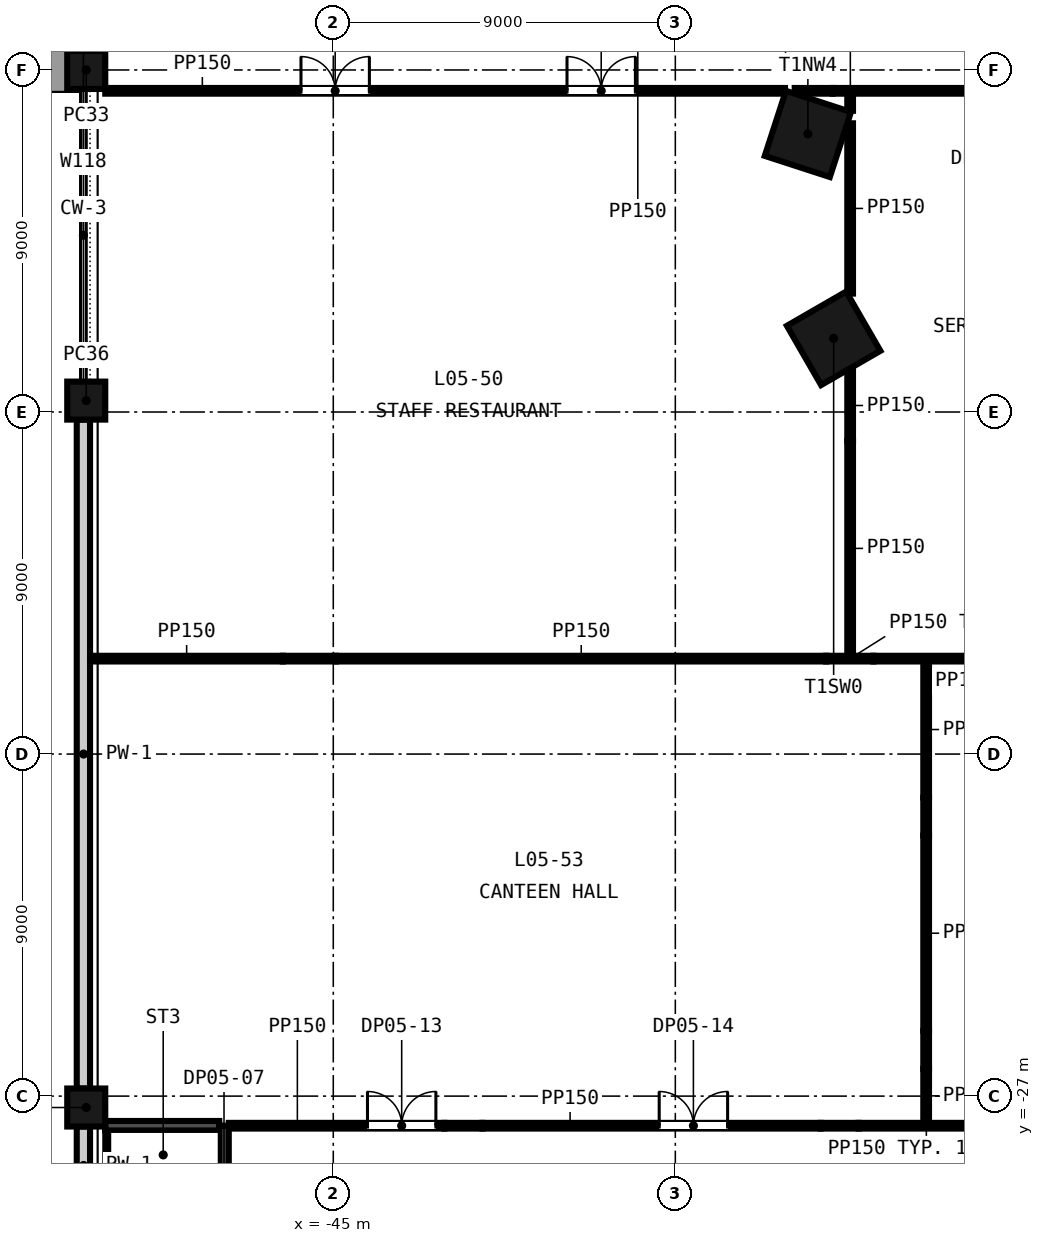
"""IFC4 building model, lengths in metres.
Left out: names, types, materials, properties, quantities, classifications, styles, units other than length and angle.
Written with IfcOpenShell. Run it as: python <this file> out.ifc"""

import sys

from ifc_helpers import new_model, si_unit, direction, frame, frame_2d, origin, origin_2d, place, context, subcontext, project, spatial, rectangle, extrude, element, fill, save


model = new_model("IFC4")
c1 = context("Model", 3, precision=1e-05, world=origin(), true_north=direction((0.0, 1.0)))
c2 = subcontext(c1, "Body", "Model", "MODEL_VIEW")
j1 = project(units=[si_unit("LENGTHUNIT", "METRE"), si_unit("PLANEANGLEUNIT", "RADIAN")], contexts=[c1])
p1 = place(None, origin())
s1 = spatial("IfcSite", under=j1, at=p1, CompositionType="ELEMENT")
p2 = place(p1, origin())
s2 = spatial("IfcBuilding", under=s1, at=p2, CompositionType="ELEMENT")
p3 = place(p2, frame((0.0, 0.0, 31.5)))
s3 = spatial("IfcBuildingStorey", under=s2, at=p3, CompositionType="ELEMENT", Elevation=31.5)
for number, where, z_axis, x_axis in (
    (1, (-32.512, -1.683, -0.3), (0.0, 0.0, 1.0), (-0.309, -0.951, 0.0)),
    (2, (-31.834, -7.061, -0.3), (0.0, 0.0, 1.0), (0.5, -0.866, 0.0)),
):
    element("IfcColumn", number, at=place(p3, frame(where, z_axis=z_axis, x_axis=x_axis)), inside=s3, PredefinedType="COLUMN", context=c2, shape_type="SweptSolid", body=[
        extrude(rectangle(XDim=1.8, YDim=1.8, at=origin_2d()), origin(), (0.0, 0.0, 1.0), 4.65),
    ])
for number, where, z_axis, x_axis in (
    (3, (-51.5, 0.0, -0.3), (0.0, 0.0, 1.0), (0.0, -1.0, 0.0)),
    (4, (-51.5, -27.3, -0.3), (0.0, 0.0, 1.0), (0.0, 1.0, 0.0)),
    (5, (-51.5, -8.7, -0.3), (0.0, 0.0, 1.0), (0.0, 1.0, 0.0)),
):
    element("IfcColumn", number, at=place(p3, frame(where, z_axis=z_axis, x_axis=x_axis)), inside=s3, PredefinedType="COLUMN", context=c2, shape_type="SweptSolid", body=[
        extrude(rectangle(XDim=1.0, YDim=1.0, at=origin_2d()), origin(), (0.0, 0.0, 1.0), 4.65),
    ])
p4 = place(p3, frame((-51.575, -9.2, -0.3), z_axis=(0.0, 0.0, 1.0), x_axis=(0.0, -1.0, 0.0)))
e6 = element("IfcWall", 6, at=p4, inside=s3, PredefinedType="SOLIDWALL", context=c2, shape_type="SweptSolid", body=[
    extrude(rectangle(XDim=17.6, YDim=0.35, at=frame_2d((8.8, 0.0))), origin(), (0.0, 0.0, 1.0), 3.75),
])
p5 = place(p3, frame((-51.575, -27.8, -0.3), z_axis=(0.0, 0.0, 1.0), x_axis=(0.0, -1.0, 0.0)))
e7 = element("IfcWall", 7, at=p5, inside=s3, PredefinedType="SOLIDWALL", context=c2, shape_type="SweptSolid", body=[
    extrude(rectangle(XDim=6.2, YDim=0.35, at=frame_2d((3.1, 0.0))), origin(), (0.0, 0.0, 1.0), 3.75),
])
p6 = place(p5, frame((2.1, 0.0, 1.2)))
e8 = element("IfcOpeningElement", 8, at=p6, cuts=e7, PredefinedType="OPENING", context=c2, shape_type="SweptSolid", body=[
    extrude(rectangle(XDim=2.0, YDim=2.5, at=frame_2d((1.0, 1.25))), frame((0.0, 0.185, 0.0), z_axis=(0.0, -1.0, 0.0), x_axis=(1.0, 0.0, 0.0)), (0.0, 0.0, 1.0), 0.37),
])
p7 = place(p3, frame((-51.0, -27.779, 0.0), z_axis=(0.0, 0.0, 1.0), x_axis=(1.0, 0.0, 0.0)))
e9 = element("IfcWall", 9, at=p7, inside=s3, PredefinedType="SHEAR", context=c2, shape_type="SweptSolid", body=[
    extrude(rectangle(XDim=3.0, YDim=0.25, at=frame_2d((1.5, 0.0))), origin(), (0.0, 0.0, 1.0), 4.35),
])
p8 = place(p3, frame((-47.75, -27.779, 0.0), z_axis=(0.0, 0.0, 1.0), x_axis=(1.0, 0.0, 0.0)))
e10 = element("IfcWall", 10, at=p8, inside=s3, PredefinedType="PARTITIONING", context=c2, shape_type="SweptSolid", body=[
    extrude(rectangle(XDim=5.676, YDim=0.15, at=frame_2d((2.838, 0.0))), origin(), (0.0, 0.0, 1.0), 4.35),
])
p9 = place(p8, frame((3.65, 0.0, 0.0)))
e11 = element("IfcOpeningElement", 11, at=p9, cuts=e10, PredefinedType="OPENING", context=c2, shape_type="SweptSolid", body=[
    extrude(rectangle(XDim=1.8, YDim=2.4, at=frame_2d((0.9, 1.2))), frame((0.0, 0.085, 0.0), z_axis=(0.0, -1.0, 0.0), x_axis=(1.0, 0.0, 0.0)), (0.0, 0.0, 1.0), 0.17),
])
p10 = place(p3, frame((-42.074, -27.779, 0.0), z_axis=(0.0, 0.0, 1.0), x_axis=(1.0, 0.0, 0.0)))
e12 = element("IfcWall", 12, at=p10, inside=s3, PredefinedType="PARTITIONING", context=c2, shape_type="SweptSolid", body=[
    extrude(rectangle(XDim=1.0, YDim=0.15, at=frame_2d((0.5, 0.0))), origin(), (0.0, 0.0, 1.0), 3.261),
])
p11 = place(p3, frame((-41.074, -27.779, 0.0), z_axis=(0.0, 0.0, 1.0), x_axis=(1.0, 0.0, 0.0)))
e13 = element("IfcWall", 13, at=p11, inside=s3, PredefinedType="PARTITIONING", context=c2, shape_type="SweptSolid", body=[
    extrude(rectangle(XDim=8.898, YDim=0.15, at=frame_2d((4.449, 0.0))), origin(), (0.0, 0.0, 1.0), 4.35),
])
p12 = place(p11, frame((4.65, 0.0, 0.0)))
e14 = element("IfcOpeningElement", 14, at=p12, cuts=e13, PredefinedType="OPENING", context=c2, shape_type="SweptSolid", body=[
    extrude(rectangle(XDim=1.8, YDim=2.4, at=frame_2d((0.9, 1.2))), frame((0.0, 0.085, 0.0), z_axis=(0.0, -1.0, 0.0), x_axis=(1.0, 0.0, 0.0)), (0.0, 0.0, 1.0), 0.17),
])
p13 = place(p3, frame((-32.176, -27.779, 0.0), z_axis=(0.0, 0.0, 1.0), x_axis=(1.0, 0.0, 0.0)))
e15 = element("IfcWall", 15, at=p13, inside=s3, PredefinedType="PARTITIONING", context=c2, shape_type="SweptSolid", body=[
    extrude(rectangle(XDim=1.0, YDim=0.15, at=frame_2d((0.5, 0.0))), origin(), (0.0, 0.0, 1.0), 3.261),
])
p14 = place(p3, frame((-31.176, -27.779, 0.0), z_axis=(0.0, 0.0, 1.0), x_axis=(1.0, 0.0, 0.0)))
e16 = element("IfcWall", 16, at=p14, inside=s3, PredefinedType="PARTITIONING", context=c2, shape_type="SweptSolid", body=[
    extrude(rectangle(XDim=6.314, YDim=0.15, at=frame_2d((3.157, 0.0))), origin(), (0.0, 0.0, 1.0), 4.35),
])
p15 = place(p3, frame((-51.4, -15.489, 0.0), z_axis=(0.0, 0.0, 1.0), x_axis=(1.0, 0.0, 0.0)))
e17 = element("IfcWall", 17, at=p15, inside=s3, PredefinedType="PARTITIONING", context=c2, shape_type="SweptSolid", body=[
    extrude(rectangle(XDim=5.073, YDim=0.15, at=frame_2d((2.537, 0.0))), origin(), (0.0, 0.0, 1.0), 4.35),
])
p16 = place(p3, frame((-46.327, -15.489, 0.0), z_axis=(0.0, 0.0, 1.0), x_axis=(1.0, 0.0, 0.0)))
e18 = element("IfcWall", 18, at=p16, inside=s3, PredefinedType="PARTITIONING", context=c2, shape_type="SweptSolid", body=[
    extrude(rectangle(XDim=1.395, YDim=0.15, at=frame_2d((0.698, 0.0))), origin(), (0.0, 0.0, 1.0), 3.369),
])
p17 = place(p3, frame((-44.932, -15.489, 0.0), z_axis=(0.0, 0.0, 1.0), x_axis=(1.0, 0.0, 0.0)))
e19 = element("IfcWall", 19, at=p17, inside=s3, PredefinedType="PARTITIONING", context=c2, shape_type="SweptSolid", body=[
    extrude(rectangle(XDim=12.901, YDim=0.15, at=frame_2d((6.451, 0.0))), origin(), (0.0, 0.0, 1.0), 4.35),
])
p18 = place(p3, frame((-32.031, -15.489, 0.0), z_axis=(0.0, 0.0, 1.0), x_axis=(1.0, 0.0, 0.0)))
e20 = element("IfcWall", 20, at=p18, inside=s3, PredefinedType="PARTITIONING", context=c2, shape_type="SweptSolid", body=[
    extrude(rectangle(XDim=1.244, YDim=0.15, at=frame_2d((0.622, 0.0))), origin(), (0.0, 0.0, 1.0), 3.261),
])
p19 = place(p3, frame((-30.787, -15.489, 0.0), z_axis=(0.0, 0.0, 1.0), x_axis=(1.0, 0.0, 0.0)))
e21 = element("IfcWall", 21, at=p19, inside=s3, PredefinedType="PARTITIONING", context=c2, shape_type="SweptSolid", body=[
    extrude(rectangle(XDim=2.692, YDim=0.15, at=frame_2d((1.346, 0.0))), origin(), (0.0, 0.0, 1.0), 4.35),
])
p20 = place(p3, frame((-51.0, -0.549, 0.0), z_axis=(0.0, 0.0, 1.0), x_axis=(1.0, 0.0, 0.0)))
e22 = element("IfcWall", 22, at=p20, inside=s3, PredefinedType="PARTITIONING", context=c2, shape_type="SweptSolid", body=[
    extrude(rectangle(XDim=17.886, YDim=0.15, at=frame_2d((8.943, 0.0))), origin(), (0.0, 0.0, 1.0), 4.35),
])
p21 = place(p20, frame((5.15, 0.0, 0.0)))
e23 = element("IfcOpeningElement", 23, at=p21, cuts=e22, PredefinedType="OPENING", context=c2, shape_type="SweptSolid", body=[
    extrude(rectangle(XDim=1.8, YDim=2.4, at=frame_2d((0.9, 1.2))), frame((0.0, 0.085, 0.0), z_axis=(0.0, -1.0, 0.0), x_axis=(1.0, 0.0, 0.0)), (0.0, 0.0, 1.0), 0.17),
])
p22 = place(p20, frame((12.15, 0.0, 0.0)))
e24 = element("IfcOpeningElement", 24, at=p22, cuts=e22, PredefinedType="OPENING", context=c2, shape_type="SweptSolid", body=[
    extrude(rectangle(XDim=1.8, YDim=2.4, at=frame_2d((0.9, 1.2))), frame((0.0, 0.085, 0.0), z_axis=(0.0, -1.0, 0.0), x_axis=(1.0, 0.0, 0.0)), (0.0, 0.0, 1.0), 0.17),
])
p23 = place(p3, frame((-32.859, -0.549, 0.0), z_axis=(0.0, 0.0, 1.0), x_axis=(1.0, 0.0, 0.0)))
e25 = element("IfcWall", 25, at=p23, inside=s3, PredefinedType="PARTITIONING", context=c2, shape_type="SweptSolid", body=[
    extrude(rectangle(XDim=1.0, YDim=0.15, at=frame_2d((0.5, 0.0))), origin(), (0.0, 0.0, 1.0), 3.5),
])
p24 = place(p3, frame((-31.859, -0.549, 0.0), z_axis=(0.0, 0.0, 1.0), x_axis=(1.0, 0.0, 0.0)))
e26 = element("IfcWall", 26, at=p24, inside=s3, PredefinedType="PARTITIONING", context=c2, shape_type="SweptSolid", body=[
    extrude(rectangle(XDim=13.784, YDim=0.15, at=frame_2d((6.892, 0.0))), origin(), (0.0, 0.0, 1.0), 4.35),
])
p25 = place(p24, frame((4.359, 0.0, 0.0)))
e27 = element("IfcOpeningElement", 27, at=p25, cuts=e26, PredefinedType="OPENING", context=c2, shape_type="SweptSolid", body=[
    extrude(rectangle(XDim=1.0, YDim=2.1, at=frame_2d((0.5, 1.05))), frame((0.0, 0.085, 0.0), z_axis=(0.0, -1.0, 0.0), x_axis=(1.0, 0.0, 0.0)), (0.0, 0.0, 1.0), 0.17),
])
p26 = place(p3, frame((-47.875, -34.6, 0.0), z_axis=(0.0, 0.0, 1.0), x_axis=(0.0, 1.0, 0.0)))
e28 = element("IfcWall", 28, at=p26, inside=s3, PredefinedType="SHEAR", context=c2, shape_type="SweptSolid", body=[
    extrude(rectangle(XDim=6.821, YDim=0.25, at=frame_2d((3.411, 0.0))), origin(), (0.0, 0.0, 1.0), 4.35),
])
p27 = place(p26, frame((0.65, 0.0, 0.0)))
e29 = element("IfcOpeningElement", 29, at=p27, cuts=e28, PredefinedType="OPENING", context=c2, shape_type="SweptSolid", body=[
    extrude(rectangle(XDim=1.2, YDim=2.1, at=frame_2d((0.6, 1.05))), frame((0.0, 0.135, 0.0), z_axis=(0.0, -1.0, 0.0), x_axis=(1.0, 0.0, 0.0)), (0.0, 0.0, 1.0), 0.27),
])
p28 = place(p3, frame((-31.4, -15.414, 0.0), z_axis=(0.0, 0.0, 1.0), x_axis=(0.0, 1.0, 0.0)))
e30 = element("IfcWall", 30, at=p28, inside=s3, PredefinedType="PARTITIONING", context=c2, shape_type="SweptSolid", body=[
    extrude(rectangle(XDim=5.65, YDim=0.15, at=frame_2d((2.825, 0.0))), origin(), (0.0, 0.0, 1.0), 4.35),
])
p29 = place(p3, frame((-31.4, -9.764, 0.0), z_axis=(0.0, 0.0, 1.0), x_axis=(0.0, 1.0, 0.0)))
e31 = element("IfcWall", 31, at=p29, inside=s3, PredefinedType="PARTITIONING", context=c2, shape_type="SweptSolid", body=[
    extrude(rectangle(XDim=1.871, YDim=0.15, at=frame_2d((0.935, 0.0))), origin(), (0.0, 0.0, 1.0), 3.5),
])
p30 = place(p3, frame((-31.4, -5.884, 0.0), z_axis=(0.0, 0.0, 1.0), x_axis=(0.0, 1.0, 0.0)))
e32 = element("IfcWall", 32, at=p30, inside=s3, PredefinedType="PARTITIONING", context=c2, shape_type="SweptSolid", body=[
    extrude(rectangle(XDim=4.48, YDim=0.15, at=frame_2d((2.24, 0.0))), origin(), (0.0, 0.0, 1.0), 4.35),
])
p31 = place(p3, frame((-31.4, -1.074, 0.0), z_axis=(0.0, 0.0, 1.0), x_axis=(0.0, 1.0, 0.0)))
e33 = element("IfcWall", 33, at=p31, inside=s3, PredefinedType="PARTITIONING", context=c2, shape_type="SweptSolid", body=[
    extrude(rectangle(XDim=0.45, YDim=0.15, at=frame_2d((0.225, 0.0))), origin(), (0.0, 0.0, 1.0), 4.35),
])
p32 = place(p3, frame((-29.4, -27.704, 0.0), z_axis=(0.0, 0.0, 1.0), x_axis=(0.0, 1.0, 0.0)))
e34 = element("IfcWall", 34, at=p32, inside=s3, PredefinedType="PARTITIONING", context=c2, shape_type="SweptSolid", body=[
    extrude(rectangle(XDim=1.421, YDim=0.15, at=frame_2d((0.71, 0.0))), origin(), (0.0, 0.0, 1.0), 4.35),
])
p33 = place(p3, frame((-29.4, -26.283, 0.0), z_axis=(0.0, 0.0, 1.0), x_axis=(0.0, 1.0, 0.0)))
e35 = element("IfcWall", 35, at=p33, inside=s3, PredefinedType="PARTITIONING", context=c2, shape_type="SweptSolid", body=[
    extrude(rectangle(XDim=1.0, YDim=0.15, at=frame_2d((0.5, 0.0))), origin(), (0.0, 0.0, 1.0), 3.261),
])
p34 = place(p3, frame((-29.4, -25.283, 0.0), z_axis=(0.0, 0.0, 1.0), x_axis=(0.0, 1.0, 0.0)))
e36 = element("IfcWall", 36, at=p34, inside=s3, PredefinedType="PARTITIONING", context=c2, shape_type="SweptSolid", body=[
    extrude(rectangle(XDim=5.139, YDim=0.15, at=frame_2d((2.569, 0.0))), origin(), (0.0, 0.0, 1.0), 4.35),
])
p35 = place(p3, frame((-29.4, -20.145, 0.0), z_axis=(0.0, 0.0, 1.0), x_axis=(0.0, 1.0, 0.0)))
e37 = element("IfcWall", 37, at=p35, inside=s3, PredefinedType="PARTITIONING", context=c2, shape_type="SweptSolid", body=[
    extrude(rectangle(XDim=1.0, YDim=0.15, at=frame_2d((0.5, 0.0))), origin(), (0.0, 0.0, 1.0), 3.261),
])
p36 = place(p3, frame((-29.4, -19.145, 0.0), z_axis=(0.0, 0.0, 1.0), x_axis=(0.0, 1.0, 0.0)))
e38 = element("IfcWall", 38, at=p36, inside=s3, PredefinedType="PARTITIONING", context=c2, shape_type="SweptSolid", body=[
    extrude(rectangle(XDim=3.581, YDim=0.15, at=frame_2d((1.79, 0.0))), origin(), (0.0, 0.0, 1.0), 4.35),
])
p37 = place(p21, origin())
e39 = element("IfcDoor", 39, at=p37, inside=s3, OperationType="SINGLE_SWING_LEFT", PredefinedType="DOOR", context=c2, shape_type="SweptSolid", body=[
    extrude(rectangle(XDim=1.8, YDim=2.4, at=frame_2d((0.9, 1.2))), frame((0.0, 0.025, 0.0), z_axis=(0.0, -1.0, 0.0), x_axis=(1.0, 0.0, 0.0)), (0.0, 0.0, 1.0), 0.05),
])
fill(e23, e39)
p38 = place(p22, origin())
e40 = element("IfcDoor", 40, at=p38, inside=s3, OperationType="SINGLE_SWING_LEFT", PredefinedType="DOOR", context=c2, shape_type="SweptSolid", body=[
    extrude(rectangle(XDim=1.8, YDim=2.4, at=frame_2d((0.9, 1.2))), frame((0.0, 0.025, 0.0), z_axis=(0.0, -1.0, 0.0), x_axis=(1.0, 0.0, 0.0)), (0.0, 0.0, 1.0), 0.05),
])
fill(e24, e40)
p39 = place(p9, origin())
e41 = element("IfcDoor", 41, at=p39, inside=s3, OperationType="SINGLE_SWING_LEFT", PredefinedType="DOOR", context=c2, shape_type="SweptSolid", body=[
    extrude(rectangle(XDim=1.8, YDim=2.4, at=frame_2d((0.9, 1.2))), frame((0.0, 0.025, 0.0), z_axis=(0.0, -1.0, 0.0), x_axis=(1.0, 0.0, 0.0)), (0.0, 0.0, 1.0), 0.05),
])
fill(e11, e41)
p40 = place(p12, origin())
e42 = element("IfcDoor", 42, at=p40, inside=s3, OperationType="SINGLE_SWING_LEFT", PredefinedType="DOOR", context=c2, shape_type="SweptSolid", body=[
    extrude(rectangle(XDim=1.8, YDim=2.4, at=frame_2d((0.9, 1.2))), frame((0.0, 0.025, 0.0), z_axis=(0.0, -1.0, 0.0), x_axis=(1.0, 0.0, 0.0)), (0.0, 0.0, 1.0), 0.05),
])
fill(e14, e42)
save(model, sys.argv[1])
